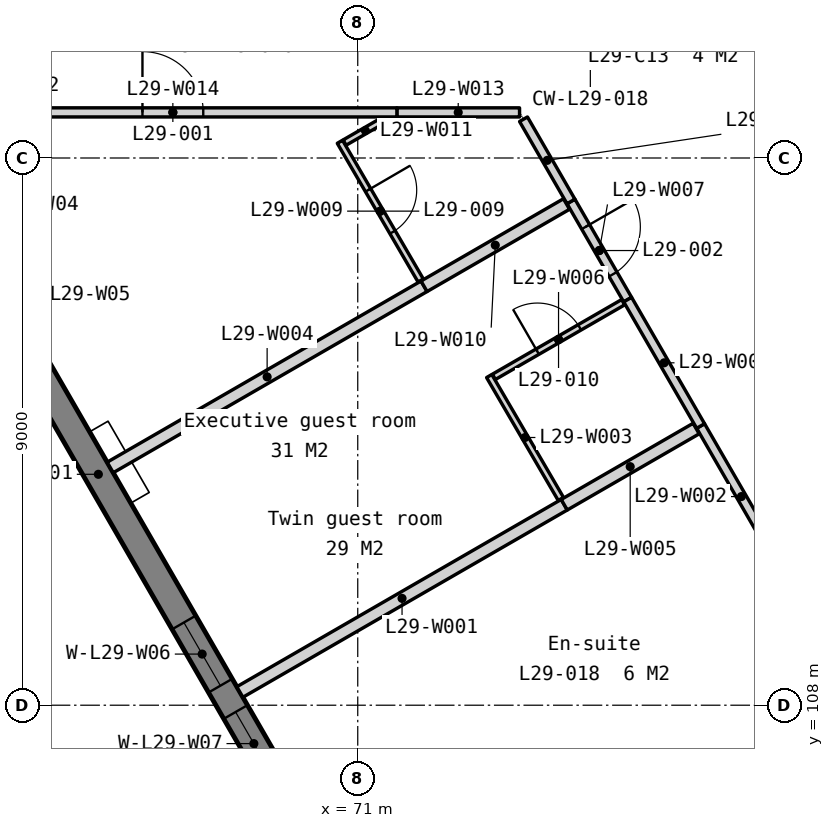
"""IFC4 building model, lengths in metres.
Left out: names, types, materials, properties, quantities, classifications, styles, units other than length and angle.
Written with IfcOpenShell. Run it as: python <this file> out.ifc"""

import sys

from ifc_helpers import new_model, si_unit, direction, frame, frame_2d, origin, place, context, subcontext, project, spatial, polyline, rectangle, outline, extrude, element, fill, save


model = new_model("IFC4")
c1 = context("Model", 3, precision=1e-05, world=origin(), true_north=direction((0.0, 1.0)))
c2 = subcontext(c1, "Body", "Model", "MODEL_VIEW")
j1 = project(units=[si_unit("LENGTHUNIT", "METRE"), si_unit("PLANEANGLEUNIT", "RADIAN")], contexts=[c1])
p1 = place(None, origin())
s1 = spatial("IfcSite", under=j1, at=p1, CompositionType="ELEMENT")
p2 = place(p1, origin())
s2 = spatial("IfcBuilding", under=s1, at=p2, CompositionType="ELEMENT")
p3 = place(p2, frame((0.0, 0.0, 116.8)))
s3 = spatial("IfcBuildingStorey", under=s2, at=p3, CompositionType="ELEMENT", Elevation=116.8)
p4 = place(p3, frame((56.073, 130.263, -0.15), z_axis=(0.0, 0.0, 1.0), x_axis=(0.500000478905, -0.866025127289, 0.0)))
e1 = element("IfcWall", 1, at=p4, inside=s3, PredefinedType="SOLIDWALL", context=c2, shape_type="SweptSolid", body=[
    extrude(outline(polyline([(42.643, 0.0), (42.643, 3.5), (0.0, 3.5), (0.0, 0.0), (42.643, 0.0)])), frame((0.0, 0.225, 0.0), z_axis=(0.0, -1.0, 0.0), x_axis=(1.0, 0.0, 0.0)), (0.0, 0.0, 1.0), 0.45),
])
p5 = place(p4, frame((0.72, 0.0, 1.05)))
e2 = element("IfcOpeningElement", 2, at=p5, cuts=e1, PredefinedType="OPENING", context=c2, shape_type="SweptSolid", body=[
    extrude(rectangle(XDim=1.2, YDim=1.5, at=frame_2d((0.6, 0.75))), frame((0.0, 0.235, 0.0), z_axis=(0.0, -1.0, 0.0), x_axis=(1.0, 0.0, 0.0)), (0.0, 0.0, 1.0), 0.47),
])
p6 = place(p4, frame((7.079, 0.0, 1.05)))
e3 = element("IfcOpeningElement", 3, at=p6, cuts=e1, PredefinedType="OPENING", context=c2, shape_type="SweptSolid", body=[
    extrude(rectangle(XDim=1.2, YDim=1.5, at=frame_2d((0.6, 0.75))), frame((0.0, 0.235, 0.0), z_axis=(0.0, -1.0, 0.0), x_axis=(1.0, 0.0, 0.0)), (0.0, 0.0, 1.0), 0.47),
])
p7 = place(p4, frame((8.779, 0.0, 1.05)))
e4 = element("IfcOpeningElement", 4, at=p7, cuts=e1, PredefinedType="OPENING", context=c2, shape_type="SweptSolid", body=[
    extrude(rectangle(XDim=1.2, YDim=1.5, at=frame_2d((0.6, 0.75))), frame((0.0, 0.235, 0.0), z_axis=(0.0, -1.0, 0.0), x_axis=(1.0, 0.0, 0.0)), (0.0, 0.0, 1.0), 0.47),
])
p8 = place(p4, frame((15.607, 0.0, 1.05)))
e5 = element("IfcOpeningElement", 5, at=p8, cuts=e1, PredefinedType="OPENING", context=c2, shape_type="SweptSolid", body=[
    extrude(rectangle(XDim=1.2, YDim=1.5, at=frame_2d((0.6, 0.75))), frame((0.0, 0.235, 0.0), z_axis=(0.0, -1.0, 0.0), x_axis=(1.0, 0.0, 0.0)), (0.0, 0.0, 1.0), 0.47),
])
p9 = place(p4, frame((17.307, 0.0, 1.05)))
e6 = element("IfcOpeningElement", 6, at=p9, cuts=e1, PredefinedType="OPENING", context=c2, shape_type="SweptSolid", body=[
    extrude(rectangle(XDim=1.2, YDim=1.5, at=frame_2d((0.6, 0.75))), frame((0.0, 0.235, 0.0), z_axis=(0.0, -1.0, 0.0), x_axis=(1.0, 0.0, 0.0)), (0.0, 0.0, 1.0), 0.47),
])
p10 = place(p4, frame((24.136, 0.0, 1.05)))
e7 = element("IfcOpeningElement", 7, at=p10, cuts=e1, PredefinedType="OPENING", context=c2, shape_type="SweptSolid", body=[
    extrude(rectangle(XDim=1.2, YDim=1.5, at=frame_2d((0.6, 0.75))), frame((0.0, 0.235, 0.0), z_axis=(0.0, -1.0, 0.0), x_axis=(1.0, 0.0, 0.0)), (0.0, 0.0, 1.0), 0.47),
])
p11 = place(p4, frame((25.836, 0.0, 1.05)))
e8 = element("IfcOpeningElement", 8, at=p11, cuts=e1, PredefinedType="OPENING", context=c2, shape_type="SweptSolid", body=[
    extrude(rectangle(XDim=1.2, YDim=1.5, at=frame_2d((0.6, 0.75))), frame((0.0, 0.235, 0.0), z_axis=(0.0, -1.0, 0.0), x_axis=(1.0, 0.0, 0.0)), (0.0, 0.0, 1.0), 0.47),
])
p12 = place(p4, frame((32.665, 0.0, 1.05)))
e9 = element("IfcOpeningElement", 9, at=p12, cuts=e1, PredefinedType="OPENING", context=c2, shape_type="SweptSolid", body=[
    extrude(rectangle(XDim=1.2, YDim=1.5, at=frame_2d((0.6, 0.75))), frame((0.0, 0.235, 0.0), z_axis=(0.0, -1.0, 0.0), x_axis=(1.0, 0.0, 0.0)), (0.0, 0.0, 1.0), 0.47),
])
p13 = place(p4, frame((34.365, 0.0, 1.05)))
e10 = element("IfcOpeningElement", 10, at=p13, cuts=e1, PredefinedType="OPENING", context=c2, shape_type="SweptSolid", body=[
    extrude(rectangle(XDim=1.2, YDim=1.5, at=frame_2d((0.6, 0.75))), frame((0.0, 0.235, 0.0), z_axis=(0.0, -1.0, 0.0), x_axis=(1.0, 0.0, 0.0)), (0.0, 0.0, 1.0), 0.47),
])
p14 = place(p4, frame((40.722, 0.0, 1.05)))
e11 = element("IfcOpeningElement", 11, at=p14, cuts=e1, PredefinedType="OPENING", context=c2, shape_type="SweptSolid", body=[
    extrude(rectangle(XDim=1.2, YDim=1.5, at=frame_2d((0.6, 0.75))), frame((0.0, 0.235, 0.0), z_axis=(0.0, -1.0, 0.0), x_axis=(1.0, 0.0, 0.0)), (0.0, 0.0, 1.0), 0.47),
])
p15 = place(p3, frame((69.061, 108.217, 0.0), z_axis=(0.0, 0.0, 1.0), x_axis=(0.866019924591, 0.500009490121, 0.0)))
e12 = element("IfcWall", 12, at=p15, inside=s3, PredefinedType="PARTITIONING", context=c2, shape_type="SweptSolid", body=[
    extrude(rectangle(XDim=6.16, YDim=0.2, at=frame_2d((3.08, 0.0))), origin(), (0.0, 0.0, 1.0), 3.35),
])
p16 = place(p3, frame((76.639, 112.592, 0.0), z_axis=(0.0, 0.0, 1.0), x_axis=(0.499958946799, -0.866049104564, 0.0)))
e13 = element("IfcWall", 13, at=p16, inside=s3, PredefinedType="PARTITIONING", context=c2, shape_type="SweptSolid", body=[
    extrude(rectangle(XDim=2.681, YDim=0.15, at=frame_2d((1.34, 0.0))), origin(), (0.0, 0.0, 1.0), 3.35),
])
p17 = place(p3, frame((73.162, 113.414, 0.0), z_axis=(0.0, 0.0, 1.0), x_axis=(0.503637463939, -0.863915102841, 0.0)))
e14 = element("IfcWall", 14, at=p17, inside=s3, PredefinedType="PARTITIONING", context=c2, shape_type="SweptSolid", body=[
    extrude(rectangle(XDim=2.34, YDim=0.1, at=frame_2d((1.17, 0.0))), origin(), (0.0, 0.0, 1.0), 3.35),
])
p18 = place(p3, frame((66.929, 111.91, 0.0), z_axis=(0.0, 0.0, 1.0), x_axis=(0.866003444533, 0.50003803261, 0.0)))
e15 = element("IfcWall", 15, at=p18, inside=s3, PredefinedType="PARTITIONING", context=c2, shape_type="SweptSolid", body=[
    extrude(rectangle(XDim=5.96, YDim=0.2, at=frame_2d((2.98, 0.0))), origin(), (0.0, 0.0, 1.0), 3.35),
])
p19 = place(p3, frame((74.396, 111.297, 0.0), z_axis=(0.0, 0.0, 1.0), x_axis=(0.866039519639, 0.499975549825, 0.0)))
e16 = element("IfcWall", 16, at=p19, inside=s3, PredefinedType="PARTITIONING", context=c2, shape_type="SweptSolid", body=[
    extrude(rectangle(XDim=2.505, YDim=0.2, at=frame_2d((1.252, 0.0))), origin(), (0.0, 0.0, 1.0), 3.35),
])
p20 = place(p3, frame((73.239, 113.401, 0.0), z_axis=(0.0, 0.0, 1.0), x_axis=(0.866031582473, 0.499989298045, 0.0)))
e17 = element("IfcWall", 17, at=p20, inside=s3, PredefinedType="PARTITIONING", context=c2, shape_type="SweptSolid", body=[
    extrude(rectangle(XDim=2.455, YDim=0.1, at=frame_2d((1.228, 0.0))), origin(), (0.0, 0.0, 1.0), 3.35),
])
p21 = place(p20, frame((0.827, 0.0, 0.0)))
e18 = element("IfcOpeningElement", 18, at=p21, cuts=e17, PredefinedType="OPENING", context=c2, shape_type="SweptSolid", body=[
    extrude(rectangle(XDim=0.8, YDim=2.1, at=frame_2d((0.4, 1.05))), frame((0.0, 0.06, 0.0), z_axis=(0.0, -1.0, 0.0), x_axis=(1.0, 0.0, 0.0)), (0.0, 0.0, 1.0), 0.12),
])
p22 = place(p3, frame((74.507, 116.285, 0.0), z_axis=(0.0, 0.0, 1.0), x_axis=(0.499998297855, -0.866026386516, 0.0)))
e19 = element("IfcWall", 19, at=p22, inside=s3, PredefinedType="PARTITIONING", context=c2, shape_type="SweptSolid", body=[
    extrude(rectangle(XDim=1.864, YDim=0.15, at=frame_2d((0.932, 0.0))), origin(), (0.0, 0.0, 1.0), 3.35),
])
p23 = place(p22, frame((0.482, 0.0, 0.0)))
e20 = element("IfcOpeningElement", 20, at=p23, cuts=e19, PredefinedType="OPENING", context=c2, shape_type="SweptSolid", body=[
    extrude(rectangle(XDim=0.9, YDim=2.1, at=frame_2d((0.45, 1.05))), frame((0.0, 0.085, 0.0), z_axis=(0.0, -1.0, 0.0), x_axis=(1.0, 0.0, 0.0)), (0.0, 0.0, 1.0), 0.17),
])
p24 = place(p3, frame((75.439, 114.671, 0.0), z_axis=(0.0, 0.0, 1.0), x_axis=(0.500077600433, -0.865980596518, 0.0)))
e21 = element("IfcWall", 21, at=p24, inside=s3, PredefinedType="PARTITIONING", context=c2, shape_type="SweptSolid", body=[
    extrude(rectangle(XDim=2.4, YDim=0.15, at=frame_2d((1.2, 0.0))), origin(), (0.0, 0.0, 1.0), 3.35),
])
p25 = place(p3, frame((70.707, 117.267, 0.0), z_axis=(0.0, 0.0, 1.0), x_axis=(0.503232687374, -0.864150948827, 0.0)))
e22 = element("IfcWall", 22, at=p25, inside=s3, PredefinedType="PARTITIONING", context=c2, shape_type="SweptSolid", body=[
    extrude(rectangle(XDim=2.64, YDim=0.1, at=frame_2d((1.32, 0.0))), origin(), (0.0, 0.0, 1.0), 3.35),
])
p26 = place(p25, frame((0.92, 0.0, 0.0)))
e23 = element("IfcOpeningElement", 23, at=p26, cuts=e22, PredefinedType="OPENING", context=c2, shape_type="SweptSolid", body=[
    extrude(rectangle(XDim=0.8, YDim=2.1, at=frame_2d((0.4, 1.05))), frame((0.0, 0.06, 0.0), z_axis=(0.0, -1.0, 0.0), x_axis=(1.0, 0.0, 0.0)), (0.0, 0.0, 1.0), 0.12),
])
p27 = place(p3, frame((72.09, 114.89, 0.0), z_axis=(0.0, 0.0, 1.0), x_axis=(0.866074375271, 0.499915169302, 0.0)))
e24 = element("IfcWall", 24, at=p27, inside=s3, PredefinedType="PARTITIONING", context=c2, shape_type="SweptSolid", body=[
    extrude(rectangle(XDim=2.705, YDim=0.2, at=frame_2d((1.353, 0.0))), origin(), (0.0, 0.0, 1.0), 3.35),
])
p28 = place(p3, frame((70.784, 117.253, 0.0), z_axis=(0.0, 0.0, 1.0), x_axis=(0.865984347675, 0.500071104525, 0.0)))
e25 = element("IfcWall", 25, at=p28, inside=s3, PredefinedType="PARTITIONING", context=c2, shape_type="SweptSolid", body=[
    extrude(rectangle(XDim=0.788, YDim=0.1, at=frame_2d((0.394, 0.0))), origin(), (0.0, 0.0, 1.0), 3.35),
])
p29 = place(p3, frame((71.644, 117.75, 0.0), z_axis=(0.0, 0.0, 1.0), x_axis=(1.0, 0.0, 0.0)))
e26 = element("IfcWall", 26, at=p29, inside=s3, PredefinedType="PARTITIONING", context=c2, shape_type="SweptSolid", body=[
    extrude(rectangle(XDim=2.017, YDim=0.15, at=frame_2d((1.009, 0.0))), origin(), (0.0, 0.0, 1.0), 3.35),
])
p30 = place(p3, frame((64.275, 117.75, 0.0), z_axis=(0.0, 0.0, 1.0), x_axis=(1.0, 0.0, 0.0)))
e27 = element("IfcWall", 27, at=p30, inside=s3, PredefinedType="PARTITIONING", context=c2, shape_type="SweptSolid", body=[
    extrude(rectangle(XDim=7.369, YDim=0.15, at=frame_2d((3.684, 0.0))), origin(), (0.0, 0.0, 1.0), 3.35),
])
p31 = place(p30, frame((3.184, 0.0, 0.0)))
e28 = element("IfcOpeningElement", 28, at=p31, cuts=e27, PredefinedType="OPENING", context=c2, shape_type="SweptSolid", body=[
    extrude(rectangle(XDim=1.0, YDim=2.1, at=frame_2d((0.5, 1.05))), frame((0.0, 0.085, 0.0), z_axis=(0.0, -1.0, 0.0), x_axis=(1.0, 0.0, 0.0)), (0.0, 0.0, 1.0), 0.17),
])
p32 = place(p3, frame((73.726, 117.637, 0.0), z_axis=(0.0, 0.0, 1.0), x_axis=(0.5000066674, -0.866021554325, 0.0)))
e29 = element("IfcWall", 29, at=p32, inside=s3, PredefinedType="PARTITIONING", context=c2, shape_type="SweptSolid", body=[
    extrude(rectangle(XDim=1.562, YDim=0.15, at=frame_2d((0.781, 0.0))), origin(), (0.0, 0.0, 1.0), 3.35),
])
p33 = place(p10, origin())
e30 = element("IfcWindow", 30, at=p33, inside=s3, PartitioningType="SINGLE_PANEL", PredefinedType="WINDOW", context=c2, shape_type="SweptSolid", body=[
    extrude(rectangle(XDim=1.2, YDim=1.5, at=frame_2d((0.6, 0.75))), frame((0.0, 0.03, 0.0), z_axis=(0.0, -1.0, 0.0), x_axis=(1.0, 0.0, 0.0)), (0.0, 0.0, 1.0), 0.06),
])
fill(e7, e30)
p34 = place(p11, origin())
e31 = element("IfcWindow", 31, at=p34, inside=s3, PartitioningType="SINGLE_PANEL", PredefinedType="WINDOW", context=c2, shape_type="SweptSolid", body=[
    extrude(rectangle(XDim=1.2, YDim=1.5, at=frame_2d((0.6, 0.75))), frame((0.0, 0.03, 0.0), z_axis=(0.0, -1.0, 0.0), x_axis=(1.0, 0.0, 0.0)), (0.0, 0.0, 1.0), 0.06),
])
fill(e8, e31)
p35 = place(p31, origin())
e32 = element("IfcDoor", 32, at=p35, inside=s3, OperationType="SINGLE_SWING_LEFT", PredefinedType="DOOR", context=c2, shape_type="SweptSolid", body=[
    extrude(rectangle(XDim=1.0, YDim=2.1, at=frame_2d((0.5, 1.05))), frame((0.0, 0.025, 0.0), z_axis=(0.0, -1.0, 0.0), x_axis=(1.0, 0.0, 0.0)), (0.0, 0.0, 1.0), 0.05),
])
fill(e28, e32)
p36 = place(p23, origin())
e33 = element("IfcDoor", 33, at=p36, inside=s3, OperationType="SINGLE_SWING_LEFT", PredefinedType="DOOR", context=c2, shape_type="SweptSolid", body=[
    extrude(rectangle(XDim=0.9, YDim=2.1, at=frame_2d((0.45, 1.05))), frame((0.0, 0.025, 0.0), z_axis=(0.0, -1.0, 0.0), x_axis=(1.0, 0.0, 0.0)), (0.0, 0.0, 1.0), 0.05),
])
fill(e20, e33)
p37 = place(p26, origin())
e34 = element("IfcDoor", 34, at=p37, inside=s3, OperationType="SINGLE_SWING_LEFT", PredefinedType="DOOR", context=c2, shape_type="SweptSolid", body=[
    extrude(rectangle(XDim=0.8, YDim=2.1, at=frame_2d((0.4, 1.05))), frame((0.0, 0.025, 0.0), z_axis=(0.0, -1.0, 0.0), x_axis=(1.0, 0.0, 0.0)), (0.0, 0.0, 1.0), 0.05),
])
fill(e23, e34)
p38 = place(p21, origin())
e35 = element("IfcDoor", 35, at=p38, inside=s3, OperationType="SINGLE_SWING_LEFT", PredefinedType="DOOR", context=c2, shape_type="SweptSolid", body=[
    extrude(rectangle(XDim=0.8, YDim=2.1, at=frame_2d((0.4, 1.05))), frame((0.0, 0.025, 0.0), z_axis=(0.0, -1.0, 0.0), x_axis=(1.0, 0.0, 0.0)), (0.0, 0.0, 1.0), 0.05),
])
fill(e18, e35)
save(model, sys.argv[1])
